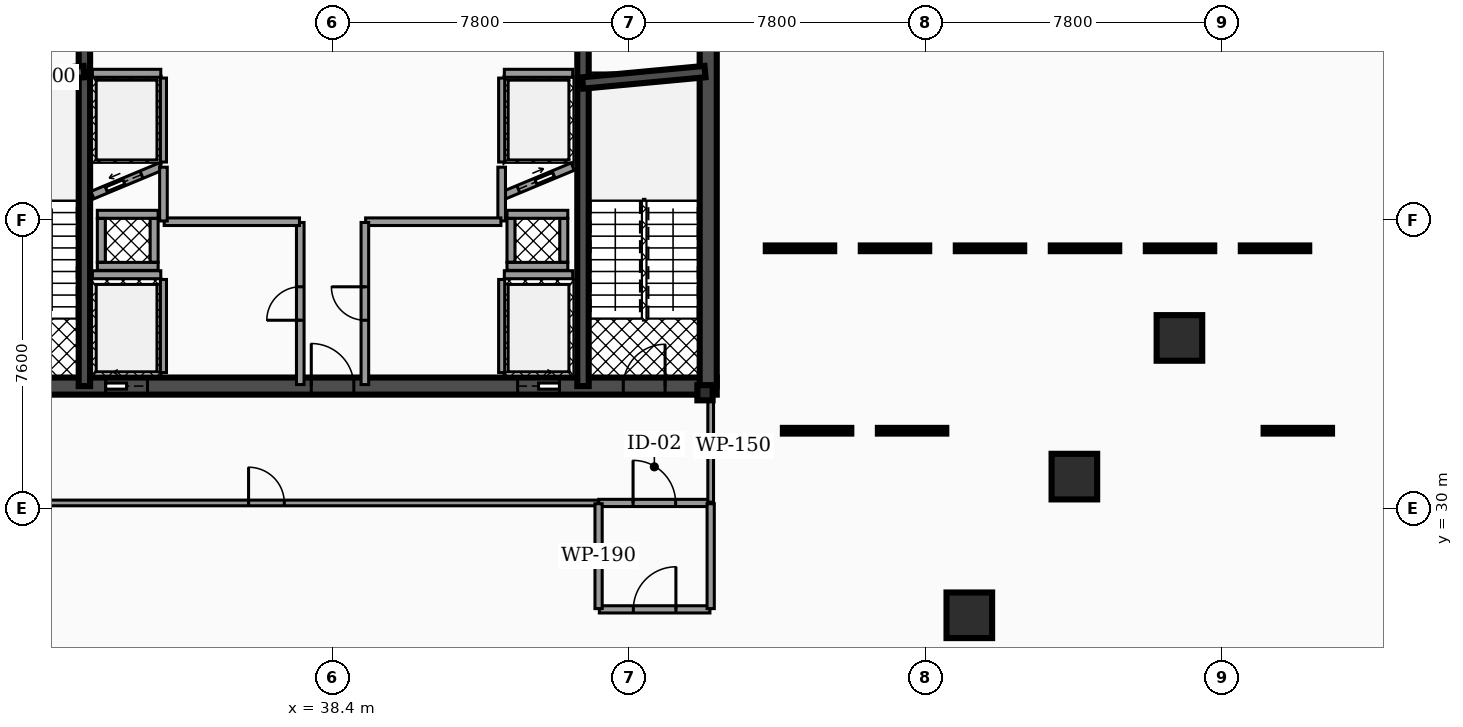
"""IFC4 building model, lengths in metres.
Left out: names, types, materials, properties, quantities, classifications, styles, units other than length and angle.
Written with IfcOpenShell. Run it as: python <this file> out.ifc"""

import sys

from ifc_helpers import new_model, si_unit, direction, frame, frame_2d, origin, origin_2d, place, context, subcontext, project, spatial, rectangle, hollow_rectangle, extrude, element, fill, save


model = new_model("IFC4")
c1 = context("Model", 3, precision=1e-05, world=origin(), true_north=direction((0.0, 1.0)))
c2 = subcontext(c1, "Body", "Model", "MODEL_VIEW")
j1 = project(units=[si_unit("LENGTHUNIT", "METRE"), si_unit("PLANEANGLEUNIT", "RADIAN")], contexts=[c1])
p1 = place(None, origin())
s1 = spatial("IfcSite", under=j1, at=p1, CompositionType="ELEMENT")
p2 = place(p1, origin())
s2 = spatial("IfcBuilding", under=s1, at=p2, CompositionType="ELEMENT")
p3 = place(p2, frame((0.0, 0.0, -4.08)))
s3 = spatial("IfcBuildingStorey", under=s2, at=p3, CompositionType="ELEMENT", Elevation=-4.08)
p4 = place(p3, frame((28.4, 33.225, 0.0), z_axis=(0.0, 0.0, 1.0), x_axis=(1.0, 0.0, 0.0)))
e1 = element("IfcWall", 1, at=p4, inside=s3, PredefinedType="SHEAR", context=c2, shape_type="SweptSolid", body=[
    extrude(rectangle(XDim=20.11, YDim=0.45, at=frame_2d((10.055, 0.0))), origin(), (0.0, 0.0, 1.0), 3.76),
])
p5 = place(p4, frame((4.03, 0.0, 0.0)))
e2 = element("IfcOpeningElement", 2, at=p5, cuts=e1, PredefinedType="OPENING", context=c2, shape_type="SweptSolid", body=[
    extrude(rectangle(XDim=1.1, YDim=2.15, at=frame_2d((0.55, 1.075))), frame((0.0, 0.235, 0.0), z_axis=(0.0, -1.0, 0.0), x_axis=(1.0, 0.0, 0.0)), (0.0, 0.0, 1.0), 0.47),
])
p6 = place(p4, frame((14.87, 0.0, 0.0)))
e3 = element("IfcOpeningElement", 3, at=p6, cuts=e1, PredefinedType="OPENING", context=c2, shape_type="SweptSolid", body=[
    extrude(rectangle(XDim=1.1, YDim=2.15, at=frame_2d((0.55, 1.075))), frame((0.0, 0.235, 0.0), z_axis=(0.0, -1.0, 0.0), x_axis=(1.0, 0.0, 0.0)), (0.0, 0.0, 1.0), 0.47),
])
p7 = place(p4, frame((1.31, 0.0, 0.0)))
e4 = element("IfcOpeningElement", 4, at=p7, cuts=e1, PredefinedType="OPENING", context=c2, shape_type="SweptSolid", body=[
    extrude(rectangle(XDim=1.1, YDim=2.2, at=frame_2d((0.55, 1.1))), frame((0.0, 0.235, 0.0), z_axis=(0.0, -1.0, 0.0), x_axis=(1.0, 0.0, 0.0)), (0.0, 0.0, 1.0), 0.47),
])
p8 = place(p4, frame((9.44, 0.0, 0.0)))
e5 = element("IfcOpeningElement", 5, at=p8, cuts=e1, PredefinedType="OPENING", context=c2, shape_type="SweptSolid", body=[
    extrude(rectangle(XDim=1.12, YDim=2.05, at=frame_2d((0.56, 1.025))), frame((0.0, 0.235, 0.0), z_axis=(0.0, -1.0, 0.0), x_axis=(1.0, 0.0, 0.0)), (0.0, 0.0, 1.0), 0.47),
])
p9 = place(p4, frame((17.65, 0.0, 0.0)))
e6 = element("IfcOpeningElement", 6, at=p9, cuts=e1, PredefinedType="OPENING", context=c2, shape_type="SweptSolid", body=[
    extrude(rectangle(XDim=1.1, YDim=2.2, at=frame_2d((0.55, 1.1))), frame((0.0, 0.235, 0.0), z_axis=(0.0, -1.0, 0.0), x_axis=(1.0, 0.0, 0.0)), (0.0, 0.0, 1.0), 0.47),
])
for number, where, z_axis, x_axis in (
    (7, (31.87, 33.225, 0.0), (0.0, 0.0, 1.0), (0.0, 1.0, 0.0)),
    (8, (44.99, 33.225, 0.0), (0.0, 0.0, 1.0), (0.0, 1.0, 0.0)),
):
    element("IfcWall", number, at=place(p3, frame(where, z_axis=z_axis, x_axis=x_axis)), inside=s3, PredefinedType="SHEAR", context=c2, shape_type="SweptSolid", body=[
        extrude(rectangle(XDim=10.25, YDim=0.3, at=frame_2d((5.125, 0.0))), origin(), (0.0, 0.0, 1.0), 3.76),
    ])
p10 = place(p3, frame((48.285, 33.225, 0.0), z_axis=(0.0, 0.0, 1.0), x_axis=(0.0, 1.0, 0.0)))
e9 = element("IfcWall", 9, at=p10, inside=s3, PredefinedType="SHEAR", context=c2, shape_type="SweptSolid", body=[
    extrude(rectangle(XDim=10.25, YDim=0.45, at=frame_2d((5.125, 0.0))), origin(), (0.0, 0.0, 1.0), 3.76),
])
p11 = place(p3, frame((28.64, 41.2, 0.0), z_axis=(0.0, 0.0, 1.0), x_axis=(0.995687118776, 0.092774789157, 0.0)))
e10 = element("IfcWall", 10, at=p11, inside=s3, PredefinedType="SHEAR", context=c2, shape_type="SweptSolid", body=[
    extrude(rectangle(XDim=3.234, YDim=0.3, at=frame_2d((1.617, 0.0))), origin(), (0.0, 0.0, 1.0), 3.76),
])
p12 = place(p3, frame((44.98, 41.2, 0.0), z_axis=(0.0, 0.0, 1.0), x_axis=(0.995686468965, 0.09278176286, 0.0)))
e11 = element("IfcWall", 11, at=p12, inside=s3, PredefinedType="SHEAR", context=c2, shape_type="SweptSolid", body=[
    extrude(rectangle(XDim=3.234, YDim=0.3, at=frame_2d((1.617, 0.0))), origin(), (0.0, 0.0, 1.0), 3.76),
])
for number, where, z_axis, x_axis in (
    (12, (55.156, 27.194, 0.0), (0.0, 0.0, 1.0), (1.0, 0.0, 0.0)),
    (13, (57.92, 30.843, 0.0), (0.0, 0.0, 1.0), (1.0, 0.0, 0.0)),
    (14, (60.685, 34.492, 0.0), (0.0, 0.0, 1.0), (1.0, 0.0, 0.0)),
):
    element("IfcColumn", number, at=place(p3, frame(where, z_axis=z_axis, x_axis=x_axis)), inside=s3, PredefinedType="COLUMN", context=c2, shape_type="SweptSolid", body=[
        extrude(hollow_rectangle(XDim=1.2, YDim=1.2, WallThickness=0.06, at=origin_2d()), origin(), (0.0, 0.0, 1.0), 3.76),
    ])
p13 = place(p3, frame((48.2, 33.05, 0.0), z_axis=(0.0, 0.0, 1.0), x_axis=(1.0, 0.0, 0.0)))
e15 = element("IfcColumn", 15, at=p13, inside=s3, PredefinedType="PILASTER", context=c2, shape_type="SweptSolid", body=[
    extrude(hollow_rectangle(XDim=0.4, YDim=0.4, WallThickness=0.02, at=origin_2d()), origin(), (0.0, 0.0, 1.0), 3.76),
])
p14 = place(p3, frame((32.08, 36.155, 0.0), z_axis=(0.0, 0.0, 1.0), x_axis=(1.0, 0.0, 0.0)))
e16 = element("IfcWall", 16, at=p14, inside=s3, PredefinedType="SOLIDWALL", context=c2, shape_type="SweptSolid", body=[
    extrude(rectangle(XDim=1.8, YDim=0.21, at=frame_2d((0.9, 0.0))), origin(), (0.0, 0.0, 1.0), 2.732),
])
p15 = place(p3, frame((33.95, 33.58, 0.0), z_axis=(0.0, 0.0, 1.0), x_axis=(0.0, 1.0, 0.0)))
e17 = element("IfcWall", 17, at=p15, inside=s3, PredefinedType="SOLIDWALL", context=c2, shape_type="SweptSolid", body=[
    extrude(rectangle(XDim=2.45, YDim=0.16, at=frame_2d((1.225, 0.0))), origin(), (0.0, 0.0, 1.0), 2.732),
])
p16 = place(p3, frame((42.92, 36.155, 0.0), z_axis=(0.0, 0.0, 1.0), x_axis=(1.0, 0.0, 0.0)))
e18 = element("IfcWall", 18, at=p16, inside=s3, PredefinedType="SOLIDWALL", context=c2, shape_type="SweptSolid", body=[
    extrude(rectangle(XDim=1.8, YDim=0.21, at=frame_2d((0.9, 0.0))), origin(), (0.0, 0.0, 1.0), 2.732),
])
p17 = place(p3, frame((42.85, 33.58, 0.0), z_axis=(0.0, 0.0, 1.0), x_axis=(0.0, 1.0, 0.0)))
e19 = element("IfcWall", 19, at=p17, inside=s3, PredefinedType="SOLIDWALL", context=c2, shape_type="SweptSolid", body=[
    extrude(rectangle(XDim=2.45, YDim=0.16, at=frame_2d((1.225, 0.0))), origin(), (0.0, 0.0, 1.0), 2.732),
])
p18 = place(p3, frame((32.08, 38.25, 0.0), z_axis=(0.0, 0.0, 1.0), x_axis=(0.923062104416, 0.384650947472, 0.0)))
e20 = element("IfcWall", 20, at=p18, inside=s3, PredefinedType="SOLIDWALL", context=c2, shape_type="SweptSolid", body=[
    extrude(rectangle(XDim=1.95, YDim=0.21, at=frame_2d((0.975, 0.0))), origin(), (0.0, 0.0, 1.0), 2.732),
])
p19 = place(p18, frame((0.4, 0.0, 0.0)))
e21 = element("IfcOpeningElement", 21, at=p19, cuts=e20, PredefinedType="OPENING", context=c2, shape_type="SweptSolid", body=[
    extrude(rectangle(XDim=1.0, YDim=2.1, at=frame_2d((0.5, 1.05))), frame((0.0, 0.115, 0.0), z_axis=(0.0, -1.0, 0.0), x_axis=(1.0, 0.0, 0.0)), (0.0, 0.0, 1.0), 0.23),
])
p20 = place(p3, frame((32.08, 41.455, 0.0), z_axis=(0.0, 0.0, 1.0), x_axis=(1.0, 0.0, 0.0)))
e22 = element("IfcWall", 22, at=p20, inside=s3, PredefinedType="SOLIDWALL", context=c2, shape_type="SweptSolid", body=[
    extrude(rectangle(XDim=1.8, YDim=0.21, at=frame_2d((0.9, 0.0))), origin(), (0.0, 0.0, 1.0), 2.732),
])
p21 = place(p3, frame((33.95, 39.12, 0.0), z_axis=(0.0, 0.0, 1.0), x_axis=(0.0, 1.0, 0.0)))
e23 = element("IfcWall", 23, at=p21, inside=s3, PredefinedType="SOLIDWALL", context=c2, shape_type="SweptSolid", body=[
    extrude(rectangle(XDim=2.21, YDim=0.16, at=frame_2d((1.105, 0.0))), origin(), (0.0, 0.0, 1.0), 2.732),
])
p22 = place(p3, frame((42.92, 38.25, 0.0), z_axis=(0.0, 0.0, 1.0), x_axis=(0.9230806271, 0.384606494839, 0.0)))
e24 = element("IfcWall", 24, at=p22, inside=s3, PredefinedType="SOLIDWALL", context=c2, shape_type="SweptSolid", body=[
    extrude(rectangle(XDim=1.95, YDim=0.21, at=frame_2d((0.975, 0.0))), origin(), (0.0, 0.0, 1.0), 2.732),
])
p23 = place(p22, frame((0.4, 0.0, 0.0)))
e25 = element("IfcOpeningElement", 25, at=p23, cuts=e24, PredefinedType="OPENING", context=c2, shape_type="SweptSolid", body=[
    extrude(rectangle(XDim=1.0, YDim=2.1, at=frame_2d((0.5, 1.05))), frame((0.0, 0.115, 0.0), z_axis=(0.0, -1.0, 0.0), x_axis=(1.0, 0.0, 0.0)), (0.0, 0.0, 1.0), 0.23),
])
p24 = place(p3, frame((42.92, 41.455, 0.0), z_axis=(0.0, 0.0, 1.0), x_axis=(1.0, 0.0, 0.0)))
e26 = element("IfcWall", 26, at=p24, inside=s3, PredefinedType="SOLIDWALL", context=c2, shape_type="SweptSolid", body=[
    extrude(rectangle(XDim=1.8, YDim=0.21, at=frame_2d((0.9, 0.0))), origin(), (0.0, 0.0, 1.0), 2.732),
])
p25 = place(p3, frame((42.85, 39.12, 0.0), z_axis=(0.0, 0.0, 1.0), x_axis=(0.0, 1.0, 0.0)))
e27 = element("IfcWall", 27, at=p25, inside=s3, PredefinedType="SOLIDWALL", context=c2, shape_type="SweptSolid", body=[
    extrude(rectangle(XDim=2.21, YDim=0.16, at=frame_2d((1.105, 0.0))), origin(), (0.0, 0.0, 1.0), 2.732),
])
for number, where, z_axis, x_axis in (
    (28, (32.21, 36.375, 0.0), (0.0, 0.0, 1.0), (1.0, 0.0, 0.0)),
    (29, (32.21, 37.745, 0.0), (0.0, 0.0, 1.0), (1.0, 0.0, 0.0)),
):
    element("IfcWall", number, at=place(p3, frame(where, z_axis=z_axis, x_axis=x_axis)), inside=s3, PredefinedType="SOLIDWALL", context=c2, shape_type="SweptSolid", body=[
        extrude(rectangle(XDim=1.6, YDim=0.21, at=frame_2d((0.8, 0.0))), origin(), (0.0, 0.0, 1.0), 3.76),
    ])
for number, where, z_axis, x_axis in (
    (30, (32.315, 36.485, 0.0), (0.0, 0.0, 1.0), (0.0, 1.0, 0.0)),
    (31, (33.705, 36.485, 0.0), (0.0, 0.0, 1.0), (0.0, 1.0, 0.0)),
):
    element("IfcWall", number, at=place(p3, frame(where, z_axis=z_axis, x_axis=x_axis)), inside=s3, PredefinedType="SOLIDWALL", context=c2, shape_type="SweptSolid", body=[
        extrude(rectangle(XDim=1.15, YDim=0.21, at=frame_2d((0.575, 0.0))), origin(), (0.0, 0.0, 1.0), 3.76),
    ])
for number, where, z_axis, x_axis in (
    (32, (42.99, 36.375, 0.0), (0.0, 0.0, 1.0), (1.0, 0.0, 0.0)),
    (33, (42.99, 37.745, 0.0), (0.0, 0.0, 1.0), (1.0, 0.0, 0.0)),
):
    element("IfcWall", number, at=place(p3, frame(where, z_axis=z_axis, x_axis=x_axis)), inside=s3, PredefinedType="SOLIDWALL", context=c2, shape_type="SweptSolid", body=[
        extrude(rectangle(XDim=1.6, YDim=0.21, at=frame_2d((0.8, 0.0))), origin(), (0.0, 0.0, 1.0), 3.76),
    ])
for number, where, z_axis, x_axis in (
    (34, (43.095, 36.485, 0.0), (0.0, 0.0, 1.0), (0.0, 1.0, 0.0)),
    (35, (44.485, 36.485, 0.0), (0.0, 0.0, 1.0), (0.0, 1.0, 0.0)),
):
    element("IfcWall", number, at=place(p3, frame(where, z_axis=z_axis, x_axis=x_axis)), inside=s3, PredefinedType="SOLIDWALL", context=c2, shape_type="SweptSolid", body=[
        extrude(rectangle(XDim=1.15, YDim=0.21, at=frame_2d((0.575, 0.0))), origin(), (0.0, 0.0, 1.0), 3.76),
    ])
p26 = place(p3, frame((37.55, 33.265, 0.0), z_axis=(0.0, 0.0, 1.0), x_axis=(0.0, 1.0, 0.0)))
e36 = element("IfcWall", 36, at=p26, inside=s3, PredefinedType="PARTITIONING", context=c2, shape_type="SweptSolid", body=[
    extrude(rectangle(XDim=4.265, YDim=0.2, at=frame_2d((2.133, 0.0))), origin(), (0.0, 0.0, 1.0), 2.717),
])
p27 = place(p26, frame((1.692, 0.0, 0.0)))
e37 = element("IfcOpeningElement", 37, at=p27, cuts=e36, PredefinedType="OPENING", context=c2, shape_type="SweptSolid", body=[
    extrude(rectangle(XDim=0.88, YDim=2.05, at=frame_2d((0.44, 1.025))), frame((0.0, 0.11, 0.0), z_axis=(0.0, -1.0, 0.0), x_axis=(1.0, 0.0, 0.0)), (0.0, 0.0, 1.0), 0.22),
])
p28 = place(p3, frame((33.97, 37.55, 0.0), z_axis=(0.0, 0.0, 1.0), x_axis=(1.0, 0.0, 0.0)))
e38 = element("IfcWall", 38, at=p28, inside=s3, PredefinedType="PARTITIONING", context=c2, shape_type="SweptSolid", body=[
    extrude(rectangle(XDim=3.56, YDim=0.2, at=frame_2d((1.78, 0.0))), origin(), (0.0, 0.0, 1.0), 2.717),
])
for number, where, z_axis, x_axis in (
    (39, (33.95, 37.57, 0.0), (0.0, 0.0, 1.0), (0.0, 1.0, 0.0)),
    (40, (42.85, 37.57, 0.0), (0.0, 0.0, 1.0), (0.0, 1.0, 0.0)),
):
    element("IfcWall", number, at=place(p3, frame(where, z_axis=z_axis, x_axis=x_axis)), inside=s3, PredefinedType="PARTITIONING", context=c2, shape_type="SweptSolid", body=[
        extrude(rectangle(XDim=1.415, YDim=0.2, at=frame_2d((0.708, 0.0))), origin(), (0.0, 0.0, 1.0), 2.717),
    ])
p29 = place(p3, frame((39.27, 37.55, 0.0), z_axis=(0.0, 0.0, 1.0), x_axis=(1.0, 0.0, 0.0)))
e41 = element("IfcWall", 41, at=p29, inside=s3, PredefinedType="PARTITIONING", context=c2, shape_type="SweptSolid", body=[
    extrude(rectangle(XDim=3.56, YDim=0.2, at=frame_2d((1.78, 0.0))), origin(), (0.0, 0.0, 1.0), 2.717),
])
p30 = place(p3, frame((39.25, 33.265, 0.0), z_axis=(0.0, 0.0, 1.0), x_axis=(0.0, 1.0, 0.0)))
e42 = element("IfcWall", 42, at=p30, inside=s3, PredefinedType="PARTITIONING", context=c2, shape_type="SweptSolid", body=[
    extrude(rectangle(XDim=4.265, YDim=0.2, at=frame_2d((2.133, 0.0))), origin(), (0.0, 0.0, 1.0), 2.717),
])
p31 = place(p30, frame((1.692, 0.0, 0.0)))
e43 = element("IfcOpeningElement", 43, at=p31, cuts=e42, PredefinedType="OPENING", context=c2, shape_type="SweptSolid", body=[
    extrude(rectangle(XDim=0.88, YDim=2.05, at=frame_2d((0.44, 1.025))), frame((0.0, 0.11, 0.0), z_axis=(0.0, -1.0, 0.0), x_axis=(1.0, 0.0, 0.0)), (0.0, 0.0, 1.0), 0.22),
])
p32 = place(p3, frame((45.405, 30.15, 0.0), z_axis=(0.0, 0.0, 1.0), x_axis=(1.0, 0.0, 0.0)))
e44 = element("IfcWall", 44, at=p32, inside=s3, PredefinedType="PARTITIONING", context=c2, shape_type="SweptSolid", body=[
    extrude(rectangle(XDim=2.925, YDim=0.19, at=frame_2d((1.462, 0.0))), origin(), (0.0, 0.0, 1.0), 2.717),
])
p33 = place(p32, frame((0.903, 0.0, 0.0)))
e45 = element("IfcOpeningElement", 45, at=p33, cuts=e44, PredefinedType="OPENING", context=c2, shape_type="SweptSolid", body=[
    extrude(rectangle(XDim=1.12, YDim=2.05, at=frame_2d((0.56, 1.025))), frame((0.0, 0.105, 0.0), z_axis=(0.0, -1.0, 0.0), x_axis=(1.0, 0.0, 0.0)), (0.0, 0.0, 1.0), 0.21),
])
p34 = place(p3, frame((48.35, 30.17, 0.0), z_axis=(0.0, 0.0, 1.0), x_axis=(0.0, 1.0, 0.0)))
e46 = element("IfcWall", 46, at=p34, inside=s3, PredefinedType="PARTITIONING", context=c2, shape_type="SweptSolid", body=[
    extrude(rectangle(XDim=2.975, YDim=0.15, at=frame_2d((1.488, 0.0))), origin(), (0.0, 0.0, 1.0), 2.717),
])
p35 = place(p3, frame((27.925, 30.15, 0.0), z_axis=(0.0, 0.0, 1.0), x_axis=(1.0, 0.0, 0.0)))
e47 = element("IfcWall", 47, at=p35, inside=s3, PredefinedType="PARTITIONING", context=c2, shape_type="SweptSolid", body=[
    extrude(rectangle(XDim=17.47, YDim=0.15, at=frame_2d((8.735, 0.0))), origin(), (0.0, 0.0, 1.0), 2.717),
])
p36 = place(p35, frame((8.265, 0.0, 0.0)))
e48 = element("IfcOpeningElement", 48, at=p36, cuts=e47, PredefinedType="OPENING", context=c2, shape_type="SweptSolid", body=[
    extrude(rectangle(XDim=0.94, YDim=2.05, at=frame_2d((0.47, 1.025))), frame((0.0, 0.085, 0.0), z_axis=(0.0, -1.0, 0.0), x_axis=(1.0, 0.0, 0.0)), (0.0, 0.0, 1.0), 0.17),
])
p37 = place(p3, frame((45.42, 27.35, 0.0), z_axis=(0.0, 0.0, 1.0), x_axis=(1.0, 0.0, 0.0)))
e49 = element("IfcWall", 49, at=p37, inside=s3, PredefinedType="PARTITIONING", context=c2, shape_type="SweptSolid", body=[
    extrude(rectangle(XDim=2.91, YDim=0.19, at=frame_2d((1.455, 0.0))), origin(), (0.0, 0.0, 1.0), 2.717),
])
p38 = place(p37, frame((0.895, 0.0, 0.0)))
e50 = element("IfcOpeningElement", 50, at=p38, cuts=e49, PredefinedType="OPENING", context=c2, shape_type="SweptSolid", body=[
    extrude(rectangle(XDim=1.12, YDim=2.05, at=frame_2d((0.56, 1.025))), frame((0.0, 0.105, 0.0), z_axis=(0.0, -1.0, 0.0), x_axis=(1.0, 0.0, 0.0)), (0.0, 0.0, 1.0), 0.21),
])
for number, where, z_axis, x_axis in (
    (51, (45.4, 27.37, 0.0), (0.0, 0.0, 1.0), (0.0, 1.0, 0.0)),
    (52, (48.35, 27.37, 0.0), (0.0, 0.0, 1.0), (0.0, 1.0, 0.0)),
):
    element("IfcWall", number, at=place(p3, frame(where, z_axis=z_axis, x_axis=x_axis)), inside=s3, PredefinedType="PARTITIONING", context=c2, shape_type="SweptSolid", body=[
        extrude(rectangle(XDim=2.76, YDim=0.19, at=frame_2d((1.38, 0.0))), origin(), (0.0, 0.0, 1.0), 2.717),
    ])
p39 = place(p5, origin())
e53 = element("IfcDoor", 53, at=p39, inside=s3, OperationType="SLIDING_TO_LEFT", PredefinedType="DOOR", context=c2, shape_type="SweptSolid", body=[
    extrude(rectangle(XDim=1.1, YDim=2.15, at=frame_2d((0.55, 1.075))), frame((0.0, 0.025, 0.0), z_axis=(0.0, -1.0, 0.0), x_axis=(1.0, 0.0, 0.0)), (0.0, 0.0, 1.0), 0.05),
])
fill(e2, e53)
p40 = place(p6, origin())
e54 = element("IfcDoor", 54, at=p40, inside=s3, OperationType="SLIDING_TO_RIGHT", PredefinedType="DOOR", context=c2, shape_type="SweptSolid", body=[
    extrude(rectangle(XDim=1.1, YDim=2.15, at=frame_2d((0.55, 1.075))), frame((0.0, 0.025, 0.0), z_axis=(0.0, -1.0, 0.0), x_axis=(1.0, 0.0, 0.0)), (0.0, 0.0, 1.0), 0.05),
])
fill(e3, e54)
p41 = place(p19, origin())
e55 = element("IfcDoor", 55, at=p41, inside=s3, OperationType="SLIDING_TO_LEFT", PredefinedType="DOOR", context=c2, shape_type="SweptSolid", body=[
    extrude(rectangle(XDim=1.0, YDim=2.1, at=frame_2d((0.5, 1.05))), frame((0.0, 0.025, 0.0), z_axis=(0.0, -1.0, 0.0), x_axis=(1.0, 0.0, 0.0)), (0.0, 0.0, 1.0), 0.05),
])
fill(e21, e55)
p42 = place(p23, origin())
e56 = element("IfcDoor", 56, at=p42, inside=s3, OperationType="SLIDING_TO_RIGHT", PredefinedType="DOOR", context=c2, shape_type="SweptSolid", body=[
    extrude(rectangle(XDim=1.0, YDim=2.1, at=frame_2d((0.5, 1.05))), frame((0.0, 0.025, 0.0), z_axis=(0.0, -1.0, 0.0), x_axis=(1.0, 0.0, 0.0)), (0.0, 0.0, 1.0), 0.05),
])
fill(e25, e56)
p43 = place(p8, origin())
e57 = element("IfcDoor", 57, at=p43, inside=s3, OperationType="SINGLE_SWING_LEFT", PredefinedType="DOOR", context=c2, shape_type="SweptSolid", body=[
    extrude(rectangle(XDim=1.12, YDim=2.05, at=frame_2d((0.56, 1.025))), frame((0.0, 0.025, 0.0), z_axis=(0.0, -1.0, 0.0), x_axis=(1.0, 0.0, 0.0)), (0.0, 0.0, 1.0), 0.05),
])
fill(e5, e57)
p44 = place(p9, origin())
e58 = element("IfcDoor", 58, at=p44, inside=s3, OperationType="SINGLE_SWING_RIGHT", PredefinedType="DOOR", context=c2, shape_type="SweptSolid", body=[
    extrude(rectangle(XDim=1.1, YDim=2.2, at=frame_2d((0.55, 1.1))), frame((0.0, 0.025, 0.0), z_axis=(0.0, -1.0, 0.0), x_axis=(1.0, 0.0, 0.0)), (0.0, 0.0, 1.0), 0.05),
])
fill(e6, e58)
p45 = place(p27, origin())
e59 = element("IfcDoor", 59, at=p45, inside=s3, OperationType="SINGLE_SWING_LEFT", PredefinedType="DOOR", context=c2, shape_type="SweptSolid", body=[
    extrude(rectangle(XDim=0.88, YDim=2.05, at=frame_2d((0.44, 1.025))), frame((0.0, 0.025, 0.0), z_axis=(0.0, -1.0, 0.0), x_axis=(1.0, 0.0, 0.0)), (0.0, 0.0, 1.0), 0.05),
])
fill(e37, e59)
p46 = place(p31, origin())
e60 = element("IfcDoor", 60, at=p46, inside=s3, OperationType="SINGLE_SWING_RIGHT", PredefinedType="DOOR", context=c2, shape_type="SweptSolid", body=[
    extrude(rectangle(XDim=0.88, YDim=2.05, at=frame_2d((0.44, 1.025))), frame((0.0, 0.025, 0.0), z_axis=(0.0, -1.0, 0.0), x_axis=(1.0, 0.0, 0.0)), (0.0, 0.0, 1.0), 0.05),
])
fill(e43, e60)
p47 = place(p33, origin())
e61 = element("IfcDoor", 61, at=p47, inside=s3, OperationType="SINGLE_SWING_LEFT", PredefinedType="DOOR", context=c2, shape_type="SweptSolid", body=[
    extrude(rectangle(XDim=1.12, YDim=2.05, at=frame_2d((0.56, 1.025))), frame((0.0, 0.025, 0.0), z_axis=(0.0, -1.0, 0.0), x_axis=(1.0, 0.0, 0.0)), (0.0, 0.0, 1.0), 0.05),
])
fill(e45, e61)
p48 = place(p36, origin())
e62 = element("IfcDoor", 62, at=p48, inside=s3, OperationType="SINGLE_SWING_LEFT", PredefinedType="DOOR", context=c2, shape_type="SweptSolid", body=[
    extrude(rectangle(XDim=0.94, YDim=2.05, at=frame_2d((0.47, 1.025))), frame((0.0, 0.025, 0.0), z_axis=(0.0, -1.0, 0.0), x_axis=(1.0, 0.0, 0.0)), (0.0, 0.0, 1.0), 0.05),
])
fill(e48, e62)
p49 = place(p38, origin())
e63 = element("IfcDoor", 63, at=p49, inside=s3, OperationType="SINGLE_SWING_RIGHT", PredefinedType="DOOR", context=c2, shape_type="SweptSolid", body=[
    extrude(rectangle(XDim=1.12, YDim=2.05, at=frame_2d((0.56, 1.025))), frame((0.0, 0.025, 0.0), z_axis=(0.0, -1.0, 0.0), x_axis=(1.0, 0.0, 0.0)), (0.0, 0.0, 1.0), 0.05),
])
fill(e50, e63)
save(model, sys.argv[1])
